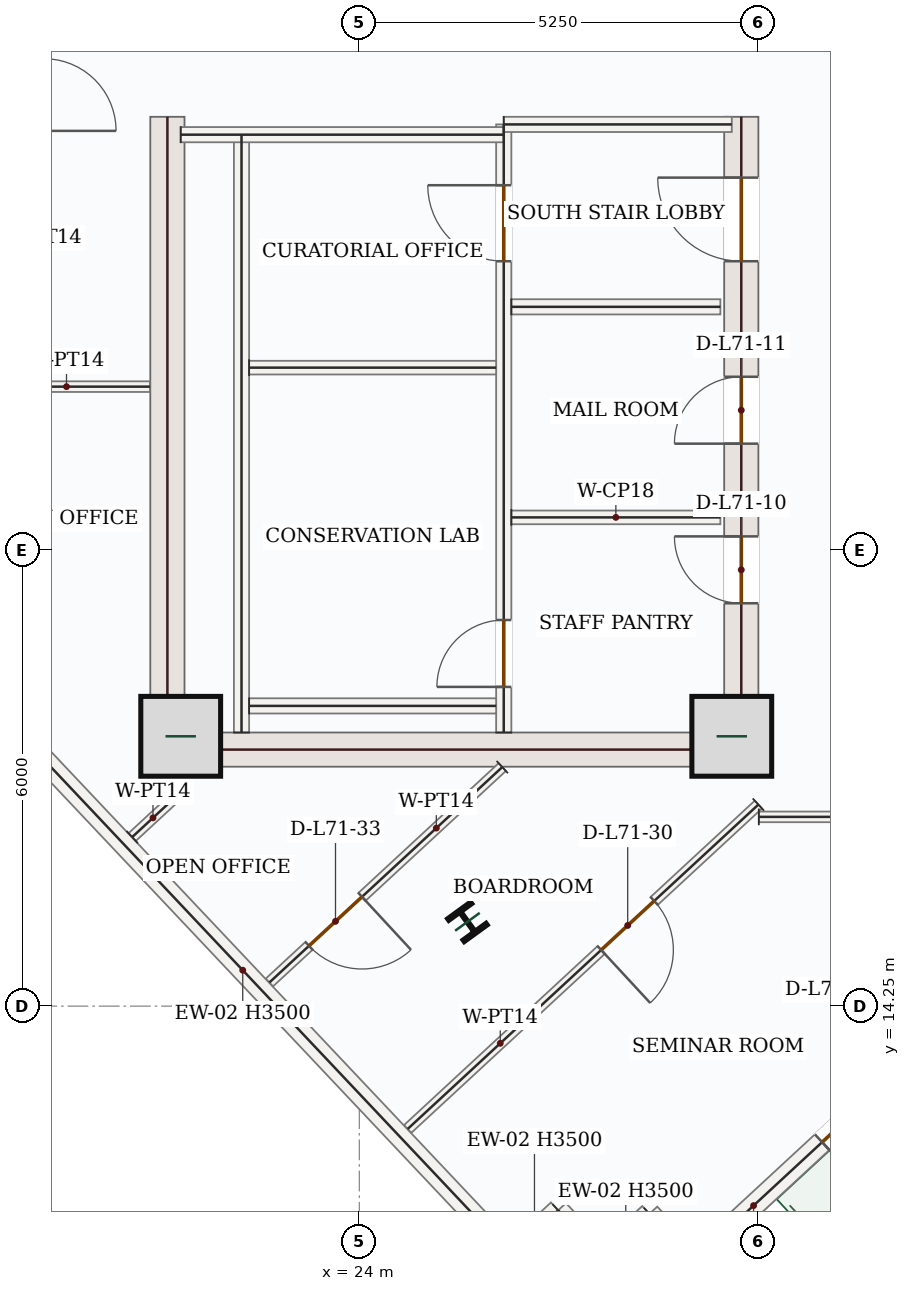
"""IFC4 building model, lengths in metres.
Left out: names, types, materials, properties, quantities, classifications, styles, units other than length and angle.
Written with IfcOpenShell. Run it as: python <this file> out.ifc"""

import sys

from ifc_helpers import new_model, si_unit, direction, frame, frame_2d, origin, origin_2d, place, context, subcontext, project, spatial, rectangle, i_section, extrude, source, transform, mapped, element, fill, save


model = new_model("IFC4")
c1 = context("Model", 3, precision=1e-05, world=origin(), true_north=direction((0.0, 1.0)))
c2 = subcontext(c1, "Body", "Model", "MODEL_VIEW")
j1 = project(units=[si_unit("LENGTHUNIT", "METRE"), si_unit("PLANEANGLEUNIT", "RADIAN")], contexts=[c1])
p1 = place(None, origin())
s1 = spatial("IfcSite", under=j1, at=p1, CompositionType="ELEMENT")
p2 = place(p1, origin())
s2 = spatial("IfcBuilding", under=s1, at=p2, CompositionType="ELEMENT")
p3 = place(p2, frame((0.0, 0.0, 295.35)))
s3 = spatial("IfcBuildingStorey", under=s2, at=p3, CompositionType="ELEMENT", Elevation=295.35)
m1 = source(origin(), c2, "Body", "SweptSolid", [
    extrude(rectangle(XDim=8.55, YDim=0.45, at=frame_2d((4.275, 0.0))), origin(), (0.0, 0.0, 1.0), 3.5),
])
p4 = place(p3, frame((21.475, 17.4, 0.0), z_axis=(0.0, 0.0, 1.0), x_axis=(0.0, 1.0, 0.0)))
e1 = element("IfcWall", 1, at=p4, inside=s3, PredefinedType="SHEAR", context=c2, shape_type="MappedRepresentation", body=[
    mapped(m1, transform((0.0, 0.0, 0.0), x_axis=(1.0, 0.0, 0.0), y_axis=(0.0, 1.0, 0.0), z_axis=(0.0, 0.0, 1.0), scale=1.0)),
])
p5 = place(p3, frame((29.025, 17.4, 0.0), z_axis=(0.0, 0.0, 1.0), x_axis=(0.0, 1.0, 0.0)))
e2 = element("IfcWall", 2, at=p5, inside=s3, PredefinedType="SHEAR", context=c2, shape_type="SweptSolid", body=[
    extrude(rectangle(XDim=8.55, YDim=0.45, at=frame_2d((4.275, 0.0))), origin(), (0.0, 0.0, 1.0), 3.5),
])
p6 = place(p5, frame((6.65, 0.0, 0.0)))
e3 = element("IfcOpeningElement", 3, at=p6, cuts=e2, PredefinedType="OPENING", context=c2, shape_type="SweptSolid", body=[
    extrude(rectangle(XDim=1.1, YDim=2.2, at=frame_2d((0.55, 1.1))), frame((0.0, 0.235, 0.0), z_axis=(0.0, -1.0, 0.0), x_axis=(1.0, 0.0, 0.0)), (0.0, 0.0, 1.0), 0.47),
])
p7 = place(p5, frame((2.15, 0.0, 0.0)))
e4 = element("IfcOpeningElement", 4, at=p7, cuts=e2, PredefinedType="OPENING", context=c2, shape_type="SweptSolid", body=[
    extrude(rectangle(XDim=0.88, YDim=2.1, at=frame_2d((0.44, 1.05))), frame((0.0, 0.235, 0.0), z_axis=(0.0, -1.0, 0.0), x_axis=(1.0, 0.0, 0.0)), (0.0, 0.0, 1.0), 0.47),
])
p8 = place(p5, frame((4.25, 0.0, 0.0)))
e5 = element("IfcOpeningElement", 5, at=p8, cuts=e2, PredefinedType="OPENING", context=c2, shape_type="SweptSolid", body=[
    extrude(rectangle(XDim=0.88, YDim=2.1, at=frame_2d((0.44, 1.05))), frame((0.0, 0.235, 0.0), z_axis=(0.0, -1.0, 0.0), x_axis=(1.0, 0.0, 0.0)), (0.0, 0.0, 1.0), 0.47),
])
m2 = source(origin(), c2, "Body", "SweptSolid", [
    extrude(rectangle(XDim=7.1, YDim=0.45, at=frame_2d((3.55, 0.0))), origin(), (0.0, 0.0, 1.0), 3.5),
])
p9 = place(p3, frame((21.7, 17.625, 0.0), z_axis=(0.0, 0.0, 1.0), x_axis=(1.0, 0.0, 0.0)))
e6 = element("IfcWall", 6, at=p9, inside=s3, PredefinedType="SHEAR", context=c2, shape_type="MappedRepresentation", body=[
    mapped(m2, transform((0.0, 0.0, 0.0), x_axis=(1.0, 0.0, 0.0), y_axis=(0.0, 1.0, 0.0), z_axis=(0.0, 0.0, 1.0), scale=1.0)),
])
m3 = source(origin(), c2, "Body", "SweptSolid", [
    extrude(rectangle(XDim=1.05, YDim=1.05, at=origin_2d()), origin(), (0.0, 0.0, 1.0), 3.75),
])
for number, where, z_axis, x_axis in (
    (7, (21.65, 17.8, 0.0), (0.0, 0.0, 1.0), (1.0, 0.0, 0.0)),
    (8, (28.9, 17.8, 0.0), (0.0, 0.0, 1.0), (1.0, 0.0, 0.0)),
):
    element("IfcColumn", number, at=place(p3, frame(where, z_axis=z_axis, x_axis=x_axis)), inside=s3, PredefinedType="COLUMN", context=c2, shape_type="MappedRepresentation", body=[
        mapped(m3, transform((0.0, 0.0, 0.0), x_axis=(1.0, 0.0, 0.0), y_axis=(0.0, 1.0, 0.0), z_axis=(0.0, 0.0, 1.0), scale=1.0)),
    ])
m4 = source(origin(), c2, "Body", "SweptSolid", [
    extrude(i_section(OverallWidth=0.374, OverallDepth=0.372, WebThickness=0.016, FlangeThickness=0.026, FilletRadius=0.018, at=origin_2d()), origin(), (0.0, 0.0, 1.0), 3.75),
])
p10 = place(p3, frame((25.422, 15.359, 0.0), z_axis=(0.0, 0.0, 1.0), x_axis=(0.809016994375, 0.587785252292, 0.0)))
e9 = element("IfcColumn", 9, at=p10, inside=s3, PredefinedType="COLUMN", context=c2, shape_type="MappedRepresentation", body=[
    mapped(m4, transform((0.0, 0.0, 0.0), x_axis=(1.0, 0.0, 0.0), y_axis=(0.0, 1.0, 0.0), z_axis=(0.0, 0.0, 1.0), scale=1.0)),
])
p11 = place(p3, frame((32.553, 14.74, 0.0), z_axis=(0.0, 0.0, 1.0), x_axis=(-0.734109106874, -0.679031530346, 0.0)))
e10 = element("IfcWall", 10, at=p11, inside=s3, PredefinedType="SOLIDWALL", context=c2, shape_type="SweptSolid", body=[
    extrude(rectangle(XDim=5.665, YDim=0.28, at=frame_2d((2.833, 0.0))), origin(), (0.0, 0.0, 1.0), 3.5),
])
p12 = place(p11, frame((2.307, 0.0, 0.0)))
e11 = element("IfcOpeningElement", 11, at=p12, cuts=e10, PredefinedType="OPENING", context=c2, shape_type="SweptSolid", body=[
    extrude(rectangle(XDim=1.05, YDim=2.15, at=frame_2d((0.525, 1.075))), frame((0.0, 0.15, 0.0), z_axis=(0.0, -1.0, 0.0), x_axis=(1.0, 0.0, 0.0)), (0.0, 0.0, 1.0), 0.3),
])
m5 = source(origin(), c2, "Body", "SweptSolid", [
    extrude(rectangle(XDim=0.85, YDim=0.28, at=frame_2d((0.425, 0.0))), origin(), (0.0, 0.0, 1.0), 3.5),
])
for number, where, z_axis, x_axis in (
    (12, (28.395, 10.893, 0.0), (0.0, 0.0, 1.0), (-0.679, 0.734, 0.0)),
    (13, (27.817, 11.517, 0.0), (0.0, 0.0, 1.0), (-0.734, -0.679, 0.0)),
    (14, (27.193, 10.94, 0.0), (0.0, 0.0, 1.0), (-0.679, 0.734, 0.0)),
    (15, (26.616, 11.564, 0.0), (0.0, 0.0, 1.0), (-0.734, -0.679, 0.0)),
):
    element("IfcWall", number, at=place(p3, frame(where, z_axis=z_axis, x_axis=x_axis)), inside=s3, PredefinedType="SOLIDWALL", context=c2, shape_type="MappedRepresentation", body=[
        mapped(m5, transform((0.0, 0.0, 0.0), x_axis=(1.0, 0.0, 0.0), y_axis=(0.0, 1.0, 0.0), z_axis=(0.0, 0.0, 1.0), scale=1.0)),
    ])
m6 = source(origin(), c2, "Body", "SweptSolid", [
    extrude(rectangle(XDim=10.274, YDim=0.28, at=frame_2d((5.137, 0.0))), origin(), (0.0, 0.0, 1.0), 3.5),
])
p13 = place(p3, frame((25.992, 10.987, 0.0), z_axis=(0.0, 0.0, 1.0), x_axis=(-0.68643580465, 0.727190405667, 0.0)))
e16 = element("IfcWall", 16, at=p13, inside=s3, PredefinedType="SOLIDWALL", context=c2, shape_type="MappedRepresentation", body=[
    mapped(m6, transform((0.0, 0.0, 0.0), x_axis=(1.0, 0.0, 0.0), y_axis=(0.0, 1.0, 0.0), z_axis=(0.0, 0.0, 1.0), scale=1.0)),
])
m7 = source(origin(), c2, "Body", "SweptSolid", [
    extrude(rectangle(XDim=7.87, YDim=0.2, at=frame_2d((3.935, 0.0))), origin(), (0.0, 0.0, 1.0), 3.5),
])
p14 = place(p3, frame((22.45, 17.85, 0.0), z_axis=(0.0, 0.0, 1.0), x_axis=(0.0, 1.0, 0.0)))
e17 = element("IfcWall", 17, at=p14, inside=s3, PredefinedType="SOLIDWALL", context=c2, shape_type="MappedRepresentation", body=[
    mapped(m7, transform((0.0, 0.0, 0.0), x_axis=(1.0, 0.0, 0.0), y_axis=(0.0, 1.0, 0.0), z_axis=(0.0, 0.0, 1.0), scale=1.0)),
])
p15 = place(p3, frame((25.9, 17.85, 0.0), z_axis=(0.0, 0.0, 1.0), x_axis=(0.0, 1.0, 0.0)))
e18 = element("IfcWall", 18, at=p15, inside=s3, PredefinedType="SOLIDWALL", context=c2, shape_type="SweptSolid", body=[
    extrude(rectangle(XDim=8.0, YDim=0.2, at=frame_2d((4.0, 0.0))), origin(), (0.0, 0.0, 1.0), 3.5),
])
p16 = place(p15, frame((6.2, 0.0, 0.0)))
e19 = element("IfcOpeningElement", 19, at=p16, cuts=e18, PredefinedType="OPENING", context=c2, shape_type="SweptSolid", body=[
    extrude(rectangle(XDim=1.0, YDim=2.15, at=frame_2d((0.5, 1.075))), frame((0.0, 0.11, 0.0), z_axis=(0.0, -1.0, 0.0), x_axis=(1.0, 0.0, 0.0)), (0.0, 0.0, 1.0), 0.22),
])
p17 = place(p15, frame((0.6, 0.0, 0.0)))
e20 = element("IfcOpeningElement", 20, at=p17, cuts=e18, PredefinedType="OPENING", context=c2, shape_type="SweptSolid", body=[
    extrude(rectangle(XDim=0.88, YDim=2.1, at=frame_2d((0.44, 1.05))), frame((0.0, 0.11, 0.0), z_axis=(0.0, -1.0, 0.0), x_axis=(1.0, 0.0, 0.0)), (0.0, 0.0, 1.0), 0.22),
])
m8 = source(origin(), c2, "Body", "SweptSolid", [
    extrude(rectangle(XDim=4.25, YDim=0.2, at=frame_2d((2.125, 0.0))), origin(), (0.0, 0.0, 1.0), 3.5),
])
p18 = place(p3, frame((21.65, 25.715, 0.0), z_axis=(0.0, 0.0, 1.0), x_axis=(1.0, 0.0, 0.0)))
e21 = element("IfcWall", 21, at=p18, inside=s3, PredefinedType="SOLIDWALL", context=c2, shape_type="MappedRepresentation", body=[
    mapped(m8, transform((0.0, 0.0, 0.0), x_axis=(1.0, 0.0, 0.0), y_axis=(0.0, 1.0, 0.0), z_axis=(0.0, 0.0, 1.0), scale=1.0)),
])
m9 = source(origin(), c2, "Body", "SweptSolid", [
    extrude(rectangle(XDim=3.0, YDim=0.2, at=frame_2d((1.5, 0.0))), origin(), (0.0, 0.0, 1.0), 3.5),
])
p19 = place(p3, frame((25.9, 25.85, 0.0), z_axis=(0.0, 0.0, 1.0), x_axis=(1.0, 0.0, 0.0)))
e22 = element("IfcWall", 22, at=p19, inside=s3, PredefinedType="SOLIDWALL", context=c2, shape_type="MappedRepresentation", body=[
    mapped(m9, transform((0.0, 0.0, 0.0), x_axis=(1.0, 0.0, 0.0), y_axis=(0.0, 1.0, 0.0), z_axis=(0.0, 0.0, 1.0), scale=1.0)),
])
m10 = source(origin(), c2, "Body", "SweptSolid", [
    extrude(rectangle(XDim=3.25, YDim=0.2, at=frame_2d((1.625, 0.0))), origin(), (0.0, 0.0, 1.0), 3.5),
])
p20 = place(p3, frame((22.55, 18.2, 0.0), z_axis=(0.0, 0.0, 1.0), x_axis=(1.0, 0.0, 0.0)))
e23 = element("IfcWall", 23, at=p20, inside=s3, PredefinedType="SOLIDWALL", context=c2, shape_type="MappedRepresentation", body=[
    mapped(m10, transform((0.0, 0.0, 0.0), x_axis=(1.0, 0.0, 0.0), y_axis=(0.0, 1.0, 0.0), z_axis=(0.0, 0.0, 1.0), scale=1.0)),
])
m11 = source(origin(), c2, "Body", "SweptSolid", [
    extrude(rectangle(XDim=3.25, YDim=0.18, at=frame_2d((1.625, 0.0))), origin(), (0.0, 0.0, 1.0), 3.5),
])
p21 = place(p3, frame((22.55, 22.65, 0.0), z_axis=(0.0, 0.0, 1.0), x_axis=(1.0, 0.0, 0.0)))
e24 = element("IfcWall", 24, at=p21, inside=s3, PredefinedType="PARTITIONING", context=c2, shape_type="MappedRepresentation", body=[
    mapped(m11, transform((0.0, 0.0, 0.0), x_axis=(1.0, 0.0, 0.0), y_axis=(0.0, 1.0, 0.0), z_axis=(0.0, 0.0, 1.0), scale=1.0)),
])
m12 = source(origin(), c2, "Body", "SweptSolid", [
    extrude(rectangle(XDim=2.75, YDim=0.2, at=frame_2d((1.375, 0.0))), origin(), (0.0, 0.0, 1.0), 3.5),
])
p22 = place(p3, frame((26.0, 23.45, 0.0), z_axis=(0.0, 0.0, 1.0), x_axis=(1.0, 0.0, 0.0)))
e25 = element("IfcWall", 25, at=p22, inside=s3, PredefinedType="SOLIDWALL", context=c2, shape_type="MappedRepresentation", body=[
    mapped(m12, transform((0.0, 0.0, 0.0), x_axis=(1.0, 0.0, 0.0), y_axis=(0.0, 1.0, 0.0), z_axis=(0.0, 0.0, 1.0), scale=1.0)),
])
m13 = source(origin(), c2, "Body", "SweptSolid", [
    extrude(rectangle(XDim=2.75, YDim=0.18, at=frame_2d((1.375, 0.0))), origin(), (0.0, 0.0, 1.0), 3.5),
])
p23 = place(p3, frame((26.0, 20.68, 0.0), z_axis=(0.0, 0.0, 1.0), x_axis=(1.0, 0.0, 0.0)))
e26 = element("IfcWall", 26, at=p23, inside=s3, PredefinedType="PARTITIONING", context=c2, shape_type="MappedRepresentation", body=[
    mapped(m13, transform((0.0, 0.0, 0.0), x_axis=(1.0, 0.0, 0.0), y_axis=(0.0, 1.0, 0.0), z_axis=(0.0, 0.0, 1.0), scale=1.0)),
])
p24 = place(p3, frame((25.881, 17.395, 0.0), z_axis=(0.0, 0.0, 1.0), x_axis=(-0.734127876216, -0.679011238024, 0.0)))
e27 = element("IfcWall", 27, at=p24, inside=s3, PredefinedType="PARTITIONING", context=c2, shape_type="SweptSolid", body=[
    extrude(rectangle(XDim=4.173, YDim=0.14, at=frame_2d((2.086, 0.0))), origin(), (0.0, 0.0, 1.0), 3.5),
])
p25 = place(p24, frame((2.514, 0.0, 0.0)))
e28 = element("IfcOpeningElement", 28, at=p25, cuts=e27, PredefinedType="OPENING", context=c2, shape_type="SweptSolid", body=[
    extrude(rectangle(XDim=0.95, YDim=2.15, at=frame_2d((0.475, 1.075))), frame((0.0, 0.08, 0.0), z_axis=(0.0, -1.0, 0.0), x_axis=(1.0, 0.0, 0.0)), (0.0, 0.0, 1.0), 0.16),
])
m14 = source(origin(), c2, "Body", "SweptSolid", [
    extrude(rectangle(XDim=0.745, YDim=0.14, at=frame_2d((0.373, 0.0))), origin(), (0.0, 0.0, 1.0), 3.5),
])
p26 = place(p3, frame((21.012, 16.474, 0.0), z_axis=(0.0, 0.0, 1.0), x_axis=(0.734262819455, 0.678865312095, 0.0)))
e29 = element("IfcWall", 29, at=p26, inside=s3, PredefinedType="PARTITIONING", context=c2, shape_type="MappedRepresentation", body=[
    mapped(m14, transform((0.0, 0.0, 0.0), x_axis=(1.0, 0.0, 0.0), y_axis=(0.0, 1.0, 0.0), z_axis=(0.0, 0.0, 1.0), scale=1.0)),
])
p27 = place(p3, frame((29.25, 16.902, 0.0), z_axis=(0.0, 0.0, 1.0), x_axis=(-0.734113479195, -0.679026803347, 0.0)))
e30 = element("IfcWall", 30, at=p27, inside=s3, PredefinedType="PARTITIONING", context=c2, shape_type="SweptSolid", body=[
    extrude(rectangle(XDim=6.284, YDim=0.14, at=frame_2d((3.142, 0.0))), origin(), (0.0, 0.0, 1.0), 3.5),
])
p28 = place(p27, frame((1.867, 0.0, 0.0)))
e31 = element("IfcOpeningElement", 31, at=p28, cuts=e30, PredefinedType="OPENING", context=c2, shape_type="SweptSolid", body=[
    extrude(rectangle(XDim=0.95, YDim=2.15, at=frame_2d((0.475, 1.075))), frame((0.0, 0.08, 0.0), z_axis=(0.0, -1.0, 0.0), x_axis=(1.0, 0.0, 0.0)), (0.0, 0.0, 1.0), 0.16),
])
m15 = source(origin(), c2, "Body", "SweptSolid", [
    extrude(rectangle(XDim=2.195, YDim=0.14, at=frame_2d((1.098, 0.0))), origin(), (0.0, 0.0, 1.0), 3.5),
])
p29 = place(p3, frame((19.05, 22.4, 0.0), z_axis=(0.0, 0.0, 1.0), x_axis=(1.0, 0.0, 0.0)))
e32 = element("IfcWall", 32, at=p29, inside=s3, PredefinedType="PARTITIONING", context=c2, shape_type="MappedRepresentation", body=[
    mapped(m15, transform((0.0, 0.0, 0.0), x_axis=(1.0, 0.0, 0.0), y_axis=(0.0, 1.0, 0.0), z_axis=(0.0, 0.0, 1.0), scale=1.0)),
])
p30 = place(p3, frame((29.256, 16.74, 0.0), z_axis=(0.0, 0.0, 1.0), x_axis=(1.0, 0.0, 0.0)))
e33 = element("IfcWall", 33, at=p30, inside=s3, PredefinedType="PARTITIONING", context=c2, shape_type="SweptSolid", body=[
    extrude(rectangle(XDim=6.354, YDim=0.14, at=frame_2d((3.177, 0.0))), origin(), (0.0, 0.0, 1.0), 3.5),
])
p31 = place(p30, frame((4.215, 0.0, 0.0)))
e34 = element("IfcOpeningElement", 34, at=p31, cuts=e33, PredefinedType="OPENING", context=c2, shape_type="SweptSolid", body=[
    extrude(rectangle(XDim=0.95, YDim=2.15, at=frame_2d((0.475, 1.075))), frame((0.0, 0.08, 0.0), z_axis=(0.0, -1.0, 0.0), x_axis=(1.0, 0.0, 0.0)), (0.0, 0.0, 1.0), 0.16),
])
m16 = source(origin(), c2, "Body", "SweptSolid", [
    extrude(rectangle(XDim=1.05, YDim=2.15, at=frame_2d((0.525, 1.075))), frame((0.0, 0.025, 0.0), z_axis=(0.0, -1.0, 0.0), x_axis=(1.0, 0.0, 0.0)), (0.0, 0.0, 1.0), 0.05),
])
p32 = place(p12, origin())
e35 = element("IfcDoor", 35, at=p32, inside=s3, OperationType="SINGLE_SWING_RIGHT", PredefinedType="DOOR", context=c2, shape_type="MappedRepresentation", body=[
    mapped(m16, transform((0.0, 0.0, 0.0), x_axis=(1.0, 0.0, 0.0), y_axis=(0.0, 1.0, 0.0), z_axis=(0.0, 0.0, 1.0), scale=1.0)),
])
fill(e11, e35)
m17 = source(origin(), c2, "Body", "SweptSolid", [
    extrude(rectangle(XDim=1.0, YDim=2.15, at=frame_2d((0.5, 1.075))), frame((0.0, 0.025, 0.0), z_axis=(0.0, -1.0, 0.0), x_axis=(1.0, 0.0, 0.0)), (0.0, 0.0, 1.0), 0.05),
])
p33 = place(p16, origin())
e36 = element("IfcDoor", 36, at=p33, inside=s3, OperationType="SINGLE_SWING_RIGHT", PredefinedType="DOOR", context=c2, shape_type="MappedRepresentation", body=[
    mapped(m17, transform((0.0, 0.0, 0.0), x_axis=(1.0, 0.0, 0.0), y_axis=(0.0, 1.0, 0.0), z_axis=(0.0, 0.0, 1.0), scale=1.0)),
])
fill(e19, e36)
m18 = source(origin(), c2, "Body", "SweptSolid", [
    extrude(rectangle(XDim=0.88, YDim=2.1, at=frame_2d((0.44, 1.05))), frame((0.0, 0.025, 0.0), z_axis=(0.0, -1.0, 0.0), x_axis=(1.0, 0.0, 0.0)), (0.0, 0.0, 1.0), 0.05),
])
p34 = place(p17, origin())
e37 = element("IfcDoor", 37, at=p34, inside=s3, OperationType="SINGLE_SWING_LEFT", PredefinedType="DOOR", context=c2, shape_type="MappedRepresentation", body=[
    mapped(m18, transform((0.0, 0.0, 0.0), x_axis=(1.0, 0.0, 0.0), y_axis=(0.0, 1.0, 0.0), z_axis=(0.0, 0.0, 1.0), scale=1.0)),
])
fill(e20, e37)
m19 = source(origin(), c2, "Body", "SweptSolid", [
    extrude(rectangle(XDim=1.1, YDim=2.2, at=frame_2d((0.55, 1.1))), frame((0.0, 0.025, 0.0), z_axis=(0.0, -1.0, 0.0), x_axis=(1.0, 0.0, 0.0)), (0.0, 0.0, 1.0), 0.05),
])
p35 = place(p6, origin())
e38 = element("IfcDoor", 38, at=p35, inside=s3, OperationType="SINGLE_SWING_RIGHT", PredefinedType="DOOR", context=c2, shape_type="MappedRepresentation", body=[
    mapped(m19, transform((0.0, 0.0, 0.0), x_axis=(1.0, 0.0, 0.0), y_axis=(0.0, 1.0, 0.0), z_axis=(0.0, 0.0, 1.0), scale=1.0)),
])
fill(e3, e38)
p36 = place(p7, origin())
e39 = element("IfcDoor", 39, at=p36, inside=s3, OperationType="SINGLE_SWING_RIGHT", PredefinedType="DOOR", context=c2, shape_type="MappedRepresentation", body=[
    mapped(m18, transform((0.0, 0.0, 0.0), x_axis=(1.0, 0.0, 0.0), y_axis=(0.0, 1.0, 0.0), z_axis=(0.0, 0.0, 1.0), scale=1.0)),
])
fill(e4, e39)
p37 = place(p8, origin())
e40 = element("IfcDoor", 40, at=p37, inside=s3, OperationType="SINGLE_SWING_LEFT", PredefinedType="DOOR", context=c2, shape_type="MappedRepresentation", body=[
    mapped(m18, transform((0.0, 0.0, 0.0), x_axis=(1.0, 0.0, 0.0), y_axis=(0.0, 1.0, 0.0), z_axis=(0.0, 0.0, 1.0), scale=1.0)),
])
fill(e5, e40)
m20 = source(origin(), c2, "Body", "SweptSolid", [
    extrude(rectangle(XDim=0.95, YDim=2.15, at=frame_2d((0.475, 1.075))), frame((0.0, 0.025, 0.0), z_axis=(0.0, -1.0, 0.0), x_axis=(1.0, 0.0, 0.0)), (0.0, 0.0, 1.0), 0.05),
])
p38 = place(p28, origin())
e41 = element("IfcDoor", 41, at=p38, inside=s3, OperationType="SINGLE_SWING_RIGHT", PredefinedType="DOOR", context=c2, shape_type="MappedRepresentation", body=[
    mapped(m20, transform((0.0, 0.0, 0.0), x_axis=(1.0, 0.0, 0.0), y_axis=(0.0, 1.0, 0.0), z_axis=(0.0, 0.0, 1.0), scale=1.0)),
])
fill(e31, e41)
p39 = place(p25, origin())
e42 = element("IfcDoor", 42, at=p39, inside=s3, OperationType="SINGLE_SWING_LEFT", PredefinedType="DOOR", context=c2, shape_type="MappedRepresentation", body=[
    mapped(m20, transform((0.0, 0.0, 0.0), x_axis=(1.0, 0.0, 0.0), y_axis=(0.0, 1.0, 0.0), z_axis=(0.0, 0.0, 1.0), scale=1.0)),
])
fill(e28, e42)
save(model, sys.argv[1])
